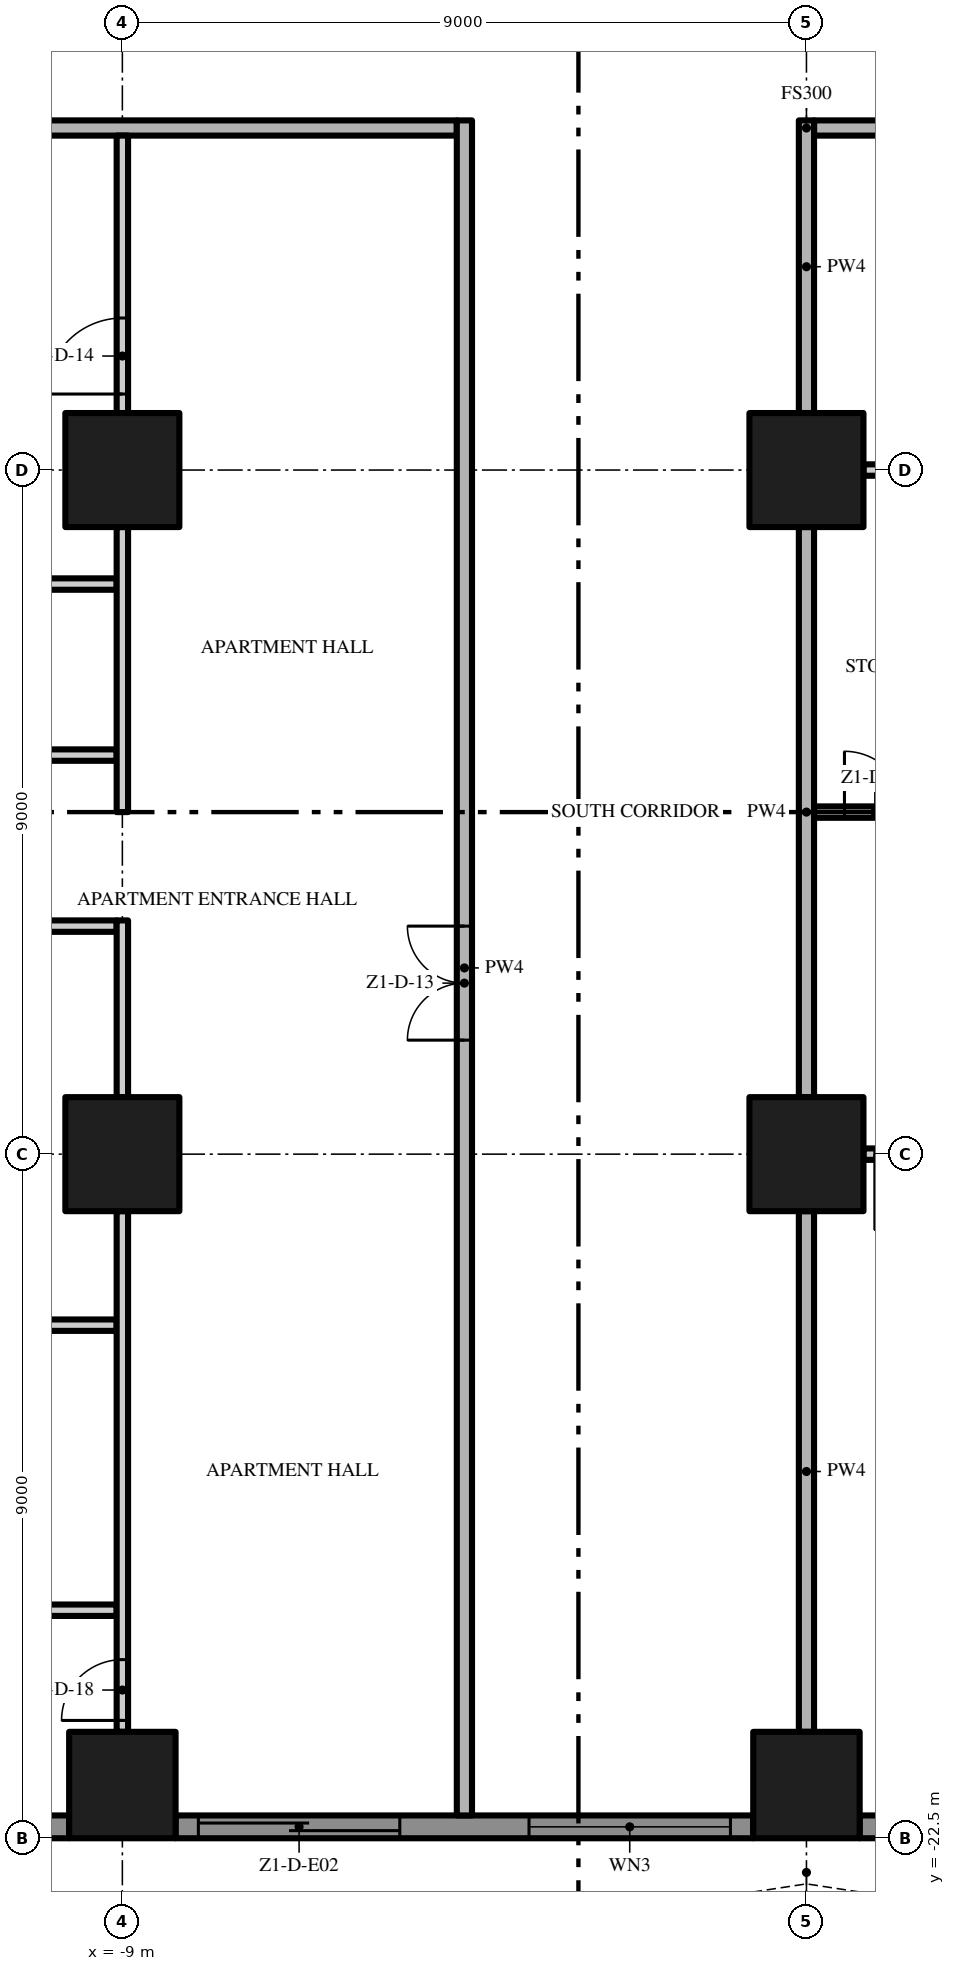
"""IFC4 building model, lengths in metres.
Left out: names, types, materials, properties, quantities, classifications, styles, units other than length and angle.
Written with IfcOpenShell. Run it as: python <this file> out.ifc"""

import sys

from ifc_helpers import new_model, si_unit, direction, frame, frame_2d, origin, origin_2d, place, context, subcontext, project, spatial, polyline, rectangle, outline, extrude, element, fill, save


model = new_model("IFC4")
c1 = context("Model", 3, precision=1e-05, world=origin(), true_north=direction((0.0, 1.0)))
c2 = subcontext(c1, "Body", "Model", "MODEL_VIEW")
j1 = project(units=[si_unit("LENGTHUNIT", "METRE"), si_unit("PLANEANGLEUNIT", "RADIAN")], contexts=[c1])
p1 = place(None, origin())
s1 = spatial("IfcSite", under=j1, at=p1, CompositionType="ELEMENT")
p2 = place(p1, origin())
s2 = spatial("IfcBuilding", under=s1, at=p2, CompositionType="ELEMENT")
p3 = place(p2, frame((0.0, 0.0, 53.0)))
s3 = spatial("IfcBuildingStorey", under=s2, at=p3, CompositionType="ELEMENT", Elevation=53.0)
p4 = place(p3, frame((-9.0, -13.5, 0.0), z_axis=(0.0, 0.0, 1.0), x_axis=(1.0, 0.0, 0.0)))
e1 = element("IfcColumn", 1, at=p4, inside=s3, PredefinedType="COLUMN", context=c2, shape_type="SweptSolid", body=[
    extrude(rectangle(XDim=1.5, YDim=1.5, at=origin_2d()), origin(), (0.0, 0.0, 1.0), 3.5),
])
p5 = place(p3, frame((-9.0, -21.8, 0.0), z_axis=(0.0, 0.0, 1.0), x_axis=(1.0, 0.0, 0.0)))
e2 = element("IfcColumn", 2, at=p5, inside=s3, PredefinedType="COLUMN", context=c2, shape_type="SweptSolid", body=[
    extrude(rectangle(XDim=1.4, YDim=1.4, at=origin_2d()), origin(), (0.0, 0.0, 1.0), 3.5),
])
for number, where, z_axis, x_axis in (
    (3, (-9.0, -4.5, 0.0), (0.0, 0.0, 1.0), (1.0, 0.0, 0.0)),
    (4, (0.0, -13.5, 0.0), (0.0, 0.0, 1.0), (1.0, 0.0, 0.0)),
):
    element("IfcColumn", number, at=place(p3, frame(where, z_axis=z_axis, x_axis=x_axis)), inside=s3, PredefinedType="COLUMN", context=c2, shape_type="SweptSolid", body=[
        extrude(rectangle(XDim=1.5, YDim=1.5, at=origin_2d()), origin(), (0.0, 0.0, 1.0), 3.5),
    ])
p6 = place(p3, frame((0.0, -21.8, 0.0), z_axis=(0.0, 0.0, 1.0), x_axis=(1.0, 0.0, 0.0)))
e5 = element("IfcColumn", 5, at=p6, inside=s3, PredefinedType="COLUMN", context=c2, shape_type="SweptSolid", body=[
    extrude(rectangle(XDim=1.4, YDim=1.4, at=origin_2d()), origin(), (0.0, 0.0, 1.0), 3.5),
])
p7 = place(p3, frame((0.0, -4.5, 0.0), z_axis=(0.0, 0.0, 1.0), x_axis=(1.0, 0.0, 0.0)))
e6 = element("IfcColumn", 6, at=p7, inside=s3, PredefinedType="COLUMN", context=c2, shape_type="SweptSolid", body=[
    extrude(rectangle(XDim=1.5, YDim=1.5, at=origin_2d()), origin(), (0.0, 0.0, 1.0), 3.5),
])
p8 = place(p3, frame((-9.7, -22.35, 0.0), z_axis=(0.0, 0.0, 1.0), x_axis=(-1.0, 0.0, 0.0)))
e7 = element("IfcWall", 7, at=p8, inside=s3, PredefinedType="SOLIDWALL", context=c2, shape_type="SweptSolid", body=[
    extrude(rectangle(XDim=7.6, YDim=0.3, at=frame_2d((3.8, 0.0))), origin(), (0.0, 0.0, 1.0), 3.5),
])
p9 = place(p8, frame((4.65, 0.0, 0.45)))
e8 = element("IfcOpeningElement", 8, at=p9, cuts=e7, PredefinedType="OPENING", context=c2, shape_type="SweptSolid", body=[
    extrude(rectangle(XDim=2.65, YDim=2.65, at=frame_2d((1.325, 1.325))), frame((0.0, 0.16, 0.0), z_axis=(0.0, -1.0, 0.0), x_axis=(1.0, 0.0, 0.0)), (0.0, 0.0, 1.0), 0.32),
])
p10 = place(p8, frame((0.3, 0.0, 0.45)))
e9 = element("IfcOpeningElement", 9, at=p10, cuts=e7, PredefinedType="OPENING", context=c2, shape_type="SweptSolid", body=[
    extrude(rectangle(XDim=2.65, YDim=2.65, at=frame_2d((1.325, 1.325))), frame((0.0, 0.16, 0.0), z_axis=(0.0, -1.0, 0.0), x_axis=(1.0, 0.0, 0.0)), (0.0, 0.0, 1.0), 0.32),
])
p11 = place(p3, frame((-0.7, -22.35, 0.0), z_axis=(0.0, 0.0, 1.0), x_axis=(-1.0, 0.0, 0.0)))
e10 = element("IfcWall", 10, at=p11, inside=s3, PredefinedType="SOLIDWALL", context=c2, shape_type="SweptSolid", body=[
    extrude(rectangle(XDim=7.6, YDim=0.3, at=frame_2d((3.8, 0.0))), origin(), (0.0, 0.0, 1.0), 3.5),
])
p12 = place(p11, frame((4.65, 0.0, 0.0)))
e11 = element("IfcOpeningElement", 11, at=p12, cuts=e10, PredefinedType="OPENING", context=c2, shape_type="SweptSolid", body=[
    extrude(rectangle(XDim=2.65, YDim=2.4, at=frame_2d((1.325, 1.2))), frame((0.0, 0.16, 0.0), z_axis=(0.0, -1.0, 0.0), x_axis=(1.0, 0.0, 0.0)), (0.0, 0.0, 1.0), 0.32),
])
p13 = place(p11, frame((0.3, 0.0, 0.45)))
e12 = element("IfcOpeningElement", 12, at=p13, cuts=e10, PredefinedType="OPENING", context=c2, shape_type="SweptSolid", body=[
    extrude(rectangle(XDim=2.65, YDim=2.65, at=frame_2d((1.325, 1.325))), frame((0.0, 0.16, 0.0), z_axis=(0.0, -1.0, 0.0), x_axis=(1.0, 0.0, 0.0)), (0.0, 0.0, 1.0), 0.32),
])
p14 = place(p3, frame((8.3, -22.35, 0.0), z_axis=(0.0, 0.0, 1.0), x_axis=(-1.0, 0.0, 0.0)))
e13 = element("IfcWall", 13, at=p14, inside=s3, PredefinedType="SOLIDWALL", context=c2, shape_type="SweptSolid", body=[
    extrude(rectangle(XDim=7.6, YDim=0.3, at=frame_2d((3.8, 0.0))), origin(), (0.0, 0.0, 1.0), 3.5),
])
p15 = place(p14, frame((4.65, 0.0, 0.45)))
e14 = element("IfcOpeningElement", 14, at=p15, cuts=e13, PredefinedType="OPENING", context=c2, shape_type="SweptSolid", body=[
    extrude(rectangle(XDim=2.65, YDim=2.65, at=frame_2d((1.325, 1.325))), frame((0.0, 0.16, 0.0), z_axis=(0.0, -1.0, 0.0), x_axis=(1.0, 0.0, 0.0)), (0.0, 0.0, 1.0), 0.32),
])
p16 = place(p14, frame((0.3, 0.0, 0.0)))
e15 = element("IfcOpeningElement", 15, at=p16, cuts=e13, PredefinedType="OPENING", context=c2, shape_type="SweptSolid", body=[
    extrude(rectangle(XDim=2.65, YDim=2.4, at=frame_2d((1.325, 1.2))), frame((0.0, 0.16, 0.0), z_axis=(0.0, -1.0, 0.0), x_axis=(1.0, 0.0, 0.0)), (0.0, 0.0, 1.0), 0.32),
])
p17 = place(p3, origin())
e16 = element("IfcWall", 16, at=p17, inside=s3, PredefinedType="USERDEFINED", context=c2, shape_type="SweptSolid", body=[
    extrude(outline(polyline([(-22.5, -25.5), (-21.0, -25.271), (-19.5, -24.671), (-18.0, -23.929), (-16.5, -23.329), (-15.0, -23.1), (-13.5, -23.329), (-12.0, -23.929), (-10.5, -24.671), (-9.0, -25.271), (-7.5, -25.5), (-6.0, -25.271), (-4.5, -24.671), (-3.0, -23.929), (-1.5, -23.329), (0.0, -23.1), (1.5, -23.329), (3.0, -23.929), (4.5, -24.671), (6.0, -25.271), (7.5, -25.5), (9.0, -25.271), (10.5, -24.671), (12.0, -23.929), (13.5, -23.329), (15.0, -23.1), (16.5, -23.329), (18.0, -23.929), (19.5, -24.671), (21.0, -25.271), (22.5, -25.5), (22.538, -25.253), (21.066, -25.028), (19.602, -24.442), (18.102, -23.701), (16.566, -23.086), (15.0, -22.847), (13.434, -23.086), (11.898, -23.701), (10.398, -24.442), (8.934, -25.028), (7.5, -25.247), (6.066, -25.028), (4.602, -24.442), (3.102, -23.701), (1.566, -23.086), (0.0, -22.847), (-1.566, -23.086), (-3.102, -23.701), (-4.602, -24.442), (-6.066, -25.028), (-7.5, -25.247), (-8.934, -25.028), (-10.398, -24.442), (-11.898, -23.701), (-13.434, -23.086), (-15.0, -22.847), (-16.566, -23.086), (-18.102, -23.701), (-19.602, -24.442), (-21.066, -25.028), (-22.538, -25.253), (-22.5, -25.5)])), origin(), (0.0, 0.0, 1.0), 0.9),
])
p18 = place(p3, frame((-13.425, -19.5, 0.0), z_axis=(0.0, 0.0, 1.0), x_axis=(1.0, 0.0, 0.0)))
e17 = element("IfcWall", 17, at=p18, inside=s3, PredefinedType="PARTITIONING", context=c2, shape_type="SweptSolid", body=[
    extrude(rectangle(XDim=4.35, YDim=0.15, at=frame_2d((2.175, 0.0))), origin(), (0.0, 0.0, 1.0), 3.5),
])
p19 = place(p3, frame((-9.075, -15.75, 0.0), z_axis=(0.0, 0.0, 1.0), x_axis=(-1.0, 0.0, 0.0)))
e18 = element("IfcWall", 18, at=p19, inside=s3, PredefinedType="PARTITIONING", context=c2, shape_type="SweptSolid", body=[
    extrude(rectangle(XDim=4.35, YDim=0.15, at=frame_2d((2.175, 0.0))), origin(), (0.0, 0.0, 1.0), 3.5),
])
p20 = place(p19, frame((1.7, 0.0, 0.0)))
e19 = element("IfcOpeningElement", 19, at=p20, cuts=e18, PredefinedType="OPENING", context=c2, shape_type="SweptSolid", body=[
    extrude(rectangle(XDim=0.9, YDim=2.1, at=frame_2d((0.45, 1.05))), frame((0.0, 0.085, 0.0), z_axis=(0.0, -1.0, 0.0), x_axis=(1.0, 0.0, 0.0)), (0.0, 0.0, 1.0), 0.17),
])
p21 = place(p3, frame((8.25, -13.5, 0.0), z_axis=(0.0, 0.0, 1.0), x_axis=(-1.0, 0.0, 0.0)))
e20 = element("IfcWall", 20, at=p21, inside=s3, PredefinedType="PARTITIONING", context=c2, shape_type="SweptSolid", body=[
    extrude(rectangle(XDim=7.5, YDim=0.15, at=frame_2d((3.75, 0.0))), origin(), (0.0, 0.0, 1.0), 3.5),
])
p22 = place(p21, frame((0.15, 0.0, 0.0)))
e21 = element("IfcOpeningElement", 21, at=p22, cuts=e20, PredefinedType="OPENING", context=c2, shape_type="SweptSolid", body=[
    extrude(rectangle(XDim=1.0, YDim=2.4, at=frame_2d((0.5, 1.2))), frame((0.0, 0.085, 0.0), z_axis=(0.0, -1.0, 0.0), x_axis=(1.0, 0.0, 0.0)), (0.0, 0.0, 1.0), 0.17),
])
p23 = place(p21, frame((6.35, 0.0, 0.0)))
e22 = element("IfcOpeningElement", 22, at=p23, cuts=e20, PredefinedType="OPENING", context=c2, shape_type="SweptSolid", body=[
    extrude(rectangle(XDim=1.0, YDim=2.4, at=frame_2d((0.5, 1.2))), frame((0.0, 0.085, 0.0), z_axis=(0.0, -1.0, 0.0), x_axis=(1.0, 0.0, 0.0)), (0.0, 0.0, 1.0), 0.17),
])
p24 = place(p3, frame((-13.425, -10.5, 0.0), z_axis=(0.0, 0.0, 1.0), x_axis=(1.0, 0.0, 0.0)))
e23 = element("IfcWall", 23, at=p24, inside=s3, PredefinedType="PARTITIONING", context=c2, shape_type="SweptSolid", body=[
    extrude(rectangle(XDim=4.35, YDim=0.15, at=frame_2d((2.175, 0.0))), origin(), (0.0, 0.0, 1.0), 3.5),
])
p25 = place(p3, frame((0.1, -9.0, 0.0), z_axis=(0.0, 0.0, 1.0), x_axis=(1.0, 0.0, 0.0)))
e24 = element("IfcWall", 24, at=p25, inside=s3, PredefinedType="PARTITIONING", context=c2, shape_type="SweptSolid", body=[
    extrude(rectangle(XDim=10.625, YDim=0.15, at=frame_2d((5.312, 0.0))), origin(), (0.0, 0.0, 1.0), 3.5),
])
p26 = place(p25, frame((7.6, 0.0, 0.0)))
e25 = element("IfcOpeningElement", 25, at=p26, cuts=e24, PredefinedType="OPENING", context=c2, shape_type="SweptSolid", body=[
    extrude(rectangle(XDim=0.9, YDim=2.1, at=frame_2d((0.45, 1.05))), frame((0.0, 0.085, 0.0), z_axis=(0.0, -1.0, 0.0), x_axis=(1.0, 0.0, 0.0)), (0.0, 0.0, 1.0), 0.17),
])
p27 = place(p25, frame((0.4, 0.0, 0.0)))
e26 = element("IfcOpeningElement", 26, at=p27, cuts=e24, PredefinedType="OPENING", context=c2, shape_type="SweptSolid", body=[
    extrude(rectangle(XDim=0.8, YDim=2.0, at=frame_2d((0.4, 1.0))), frame((0.0, 0.085, 0.0), z_axis=(0.0, -1.0, 0.0), x_axis=(1.0, 0.0, 0.0)), (0.0, 0.0, 1.0), 0.17),
])
p28 = place(p3, frame((-13.425, -8.25, 0.0), z_axis=(0.0, 0.0, 1.0), x_axis=(1.0, 0.0, 0.0)))
e27 = element("IfcWall", 27, at=p28, inside=s3, PredefinedType="PARTITIONING", context=c2, shape_type="SweptSolid", body=[
    extrude(rectangle(XDim=4.35, YDim=0.15, at=frame_2d((2.175, 0.0))), origin(), (0.0, 0.0, 1.0), 3.5),
])
p29 = place(p28, frame((1.75, 0.0, 0.0)))
e28 = element("IfcOpeningElement", 28, at=p29, cuts=e27, PredefinedType="OPENING", context=c2, shape_type="SweptSolid", body=[
    extrude(rectangle(XDim=0.9, YDim=2.1, at=frame_2d((0.45, 1.05))), frame((0.0, 0.085, 0.0), z_axis=(0.0, -1.0, 0.0), x_axis=(1.0, 0.0, 0.0)), (0.0, 0.0, 1.0), 0.17),
])
p30 = place(p3, frame((-13.425, -6.0, 0.0), z_axis=(0.0, 0.0, 1.0), x_axis=(1.0, 0.0, 0.0)))
e29 = element("IfcWall", 29, at=p30, inside=s3, PredefinedType="PARTITIONING", context=c2, shape_type="SweptSolid", body=[
    extrude(rectangle(XDim=4.35, YDim=0.15, at=frame_2d((2.175, 0.0))), origin(), (0.0, 0.0, 1.0), 3.5),
])
p31 = place(p3, frame((0.75, -4.5, 0.0), z_axis=(0.0, 0.0, 1.0), x_axis=(1.0, 0.0, 0.0)))
e30 = element("IfcWall", 30, at=p31, inside=s3, PredefinedType="PARTITIONING", context=c2, shape_type="SweptSolid", body=[
    extrude(rectangle(XDim=7.5, YDim=0.15, at=frame_2d((3.75, 0.0))), origin(), (0.0, 0.0, 1.0), 3.5),
])
p32 = place(p3, frame((-17.4, 0.0, 0.0), z_axis=(0.0, 0.0, 1.0), x_axis=(1.0, 0.0, 0.0)))
e31 = element("IfcWall", 31, at=p32, inside=s3, PredefinedType="PARTITIONING", context=c2, shape_type="SweptSolid", body=[
    extrude(rectangle(XDim=12.8, YDim=0.2, at=frame_2d((6.4, 0.0))), origin(), (0.0, 0.0, 1.0), 3.5),
])
p33 = place(p3, frame((17.4, 0.0, 0.0), z_axis=(0.0, 0.0, 1.0), x_axis=(-1.0, 0.0, 0.0)))
e32 = element("IfcWall", 32, at=p33, inside=s3, PredefinedType="PARTITIONING", context=c2, shape_type="SweptSolid", body=[
    extrude(rectangle(XDim=17.3, YDim=0.2, at=frame_2d((8.65, 0.0))), origin(), (0.0, 0.0, 1.0), 3.5),
])
p34 = place(p33, frame((7.65, 0.0, 0.0)))
e33 = element("IfcOpeningElement", 33, at=p34, cuts=e32, PredefinedType="OPENING", context=c2, shape_type="SweptSolid", body=[
    extrude(rectangle(XDim=1.5, YDim=2.4, at=frame_2d((0.75, 1.2))), frame((0.0, 0.11, 0.0), z_axis=(0.0, -1.0, 0.0), x_axis=(1.0, 0.0, 0.0)), (0.0, 0.0, 1.0), 0.22),
])
p35 = place(p3, frame((-9.0, -21.1, 0.0), z_axis=(0.0, 0.0, 1.0), x_axis=(0.0, 1.0, 0.0)))
e34 = element("IfcWall", 34, at=p35, inside=s3, PredefinedType="PARTITIONING", context=c2, shape_type="SweptSolid", body=[
    extrude(rectangle(XDim=6.85, YDim=0.15, at=frame_2d((3.425, 0.0))), origin(), (0.0, 0.0, 1.0), 3.5),
])
p36 = place(p35, frame((0.15, 0.0, 0.0)))
e35 = element("IfcOpeningElement", 35, at=p36, cuts=e34, PredefinedType="OPENING", context=c2, shape_type="SweptSolid", body=[
    extrude(rectangle(XDim=0.8, YDim=2.0, at=frame_2d((0.4, 1.0))), frame((0.0, 0.085, 0.0), z_axis=(0.0, -1.0, 0.0), x_axis=(1.0, 0.0, 0.0)), (0.0, 0.0, 1.0), 0.17),
])
p37 = place(p3, frame((-9.0, -12.75, 0.0), z_axis=(0.0, 0.0, 1.0), x_axis=(0.0, 1.0, 0.0)))
e36 = element("IfcWall", 36, at=p37, inside=s3, PredefinedType="PARTITIONING", context=c2, shape_type="SweptSolid", body=[
    extrude(rectangle(XDim=2.325, YDim=0.15, at=frame_2d((1.163, 0.0))), origin(), (0.0, 0.0, 1.0), 3.5),
])
p38 = place(p3, frame((-9.0, -9.0, 0.0), z_axis=(0.0, 0.0, 1.0), x_axis=(0.0, 1.0, 0.0)))
e37 = element("IfcWall", 37, at=p38, inside=s3, PredefinedType="PARTITIONING", context=c2, shape_type="SweptSolid", body=[
    extrude(rectangle(XDim=3.75, YDim=0.15, at=frame_2d((1.875, 0.0))), origin(), (0.0, 0.0, 1.0), 3.5),
])
p39 = place(p3, frame((-9.0, -3.75, 0.0), z_axis=(0.0, 0.0, 1.0), x_axis=(0.0, 1.0, 0.0)))
e38 = element("IfcWall", 38, at=p39, inside=s3, PredefinedType="PARTITIONING", context=c2, shape_type="SweptSolid", body=[
    extrude(rectangle(XDim=3.65, YDim=0.15, at=frame_2d((1.825, 0.0))), origin(), (0.0, 0.0, 1.0), 3.5),
])
p40 = place(p39, frame((0.25, 0.0, 0.0)))
e39 = element("IfcOpeningElement", 39, at=p40, cuts=e38, PredefinedType="OPENING", context=c2, shape_type="SweptSolid", body=[
    extrude(rectangle(XDim=1.0, YDim=2.4, at=frame_2d((0.5, 1.2))), frame((0.0, 0.085, 0.0), z_axis=(0.0, -1.0, 0.0), x_axis=(1.0, 0.0, 0.0)), (0.0, 0.0, 1.0), 0.17),
])
p41 = place(p3, frame((-4.5, -22.2, 0.0), z_axis=(0.0, 0.0, 1.0), x_axis=(0.0, 1.0, 0.0)))
e40 = element("IfcWall", 40, at=p41, inside=s3, PredefinedType="PARTITIONING", context=c2, shape_type="SweptSolid", body=[
    extrude(rectangle(XDim=22.3, YDim=0.2, at=frame_2d((11.15, 0.0))), origin(), (0.0, 0.0, 1.0), 3.5),
])
p42 = place(p41, frame((10.2, 0.0, 0.0)))
e41 = element("IfcOpeningElement", 41, at=p42, cuts=e40, PredefinedType="OPENING", context=c2, shape_type="SweptSolid", body=[
    extrude(rectangle(XDim=1.5, YDim=2.4, at=frame_2d((0.75, 1.2))), frame((0.0, 0.11, 0.0), z_axis=(0.0, -1.0, 0.0), x_axis=(1.0, 0.0, 0.0)), (0.0, 0.0, 1.0), 0.22),
])
p43 = place(p3, frame((0.0, -21.1, 0.0), z_axis=(0.0, 0.0, 1.0), x_axis=(0.0, 1.0, 0.0)))
e42 = element("IfcWall", 42, at=p43, inside=s3, PredefinedType="PARTITIONING", context=c2, shape_type="SweptSolid", body=[
    extrude(rectangle(XDim=6.85, YDim=0.2, at=frame_2d((3.425, 0.0))), origin(), (0.0, 0.0, 1.0), 3.5),
])
p44 = place(p3, frame((0.0, -12.75, 0.0), z_axis=(0.0, 0.0, 1.0), x_axis=(0.0, 1.0, 0.0)))
e43 = element("IfcWall", 43, at=p44, inside=s3, PredefinedType="PARTITIONING", context=c2, shape_type="SweptSolid", body=[
    extrude(rectangle(XDim=7.5, YDim=0.2, at=frame_2d((3.75, 0.0))), origin(), (0.0, 0.0, 1.0), 3.5),
])
p45 = place(p3, frame((0.0, -3.75, 0.0), z_axis=(0.0, 0.0, 1.0), x_axis=(0.0, 1.0, 0.0)))
e44 = element("IfcWall", 44, at=p45, inside=s3, PredefinedType="PARTITIONING", context=c2, shape_type="SweptSolid", body=[
    extrude(rectangle(XDim=3.85, YDim=0.2, at=frame_2d((1.925, 0.0))), origin(), (0.0, 0.0, 1.0), 3.5),
])
p46 = place(p12, origin())
e45 = element("IfcDoor", 45, at=p46, inside=s3, OperationType="SINGLE_SWING_LEFT", PredefinedType="DOOR", context=c2, shape_type="SweptSolid", body=[
    extrude(rectangle(XDim=2.65, YDim=2.4, at=frame_2d((1.325, 1.2))), frame((0.0, 0.025, 0.0), z_axis=(0.0, -1.0, 0.0), x_axis=(1.0, 0.0, 0.0)), (0.0, 0.0, 1.0), 0.05),
])
fill(e11, e45)
p47 = place(p13, origin())
e46 = element("IfcWindow", 46, at=p47, inside=s3, PartitioningType="SINGLE_PANEL", PredefinedType="WINDOW", context=c2, shape_type="SweptSolid", body=[
    extrude(rectangle(XDim=2.65, YDim=2.65, at=frame_2d((1.325, 1.325))), frame((0.0, 0.03, 0.0), z_axis=(0.0, -1.0, 0.0), x_axis=(1.0, 0.0, 0.0)), (0.0, 0.0, 1.0), 0.06),
])
fill(e12, e46)
p48 = place(p42, origin())
e47 = element("IfcDoor", 47, at=p48, inside=s3, OperationType="DOUBLE_DOOR_SINGLE_SWING", PredefinedType="DOOR", context=c2, shape_type="SweptSolid", body=[
    extrude(rectangle(XDim=1.5, YDim=2.4, at=frame_2d((0.75, 1.2))), frame((0.0, 0.025, 0.0), z_axis=(0.0, -1.0, 0.0), x_axis=(1.0, 0.0, 0.0)), (0.0, 0.0, 1.0), 0.05),
])
fill(e41, e47)
p49 = place(p40, origin())
e48 = element("IfcDoor", 48, at=p49, inside=s3, OperationType="SINGLE_SWING_LEFT", PredefinedType="DOOR", context=c2, shape_type="SweptSolid", body=[
    extrude(rectangle(XDim=1.0, YDim=2.4, at=frame_2d((0.5, 1.2))), frame((0.0, 0.025, 0.0), z_axis=(0.0, -1.0, 0.0), x_axis=(1.0, 0.0, 0.0)), (0.0, 0.0, 1.0), 0.05),
])
fill(e39, e48)
p50 = place(p36, origin())
e49 = element("IfcDoor", 49, at=p50, inside=s3, OperationType="SINGLE_SWING_LEFT", PredefinedType="DOOR", context=c2, shape_type="SweptSolid", body=[
    extrude(rectangle(XDim=0.8, YDim=2.0, at=frame_2d((0.4, 1.0))), frame((0.0, 0.025, 0.0), z_axis=(0.0, -1.0, 0.0), x_axis=(1.0, 0.0, 0.0)), (0.0, 0.0, 1.0), 0.05),
])
fill(e35, e49)
p51 = place(p27, origin())
e50 = element("IfcDoor", 50, at=p51, inside=s3, OperationType="SINGLE_SWING_LEFT", PredefinedType="DOOR", context=c2, shape_type="SweptSolid", body=[
    extrude(rectangle(XDim=0.8, YDim=2.0, at=frame_2d((0.4, 1.0))), frame((0.0, 0.025, 0.0), z_axis=(0.0, -1.0, 0.0), x_axis=(1.0, 0.0, 0.0)), (0.0, 0.0, 1.0), 0.05),
])
fill(e26, e50)
save(model, sys.argv[1])
